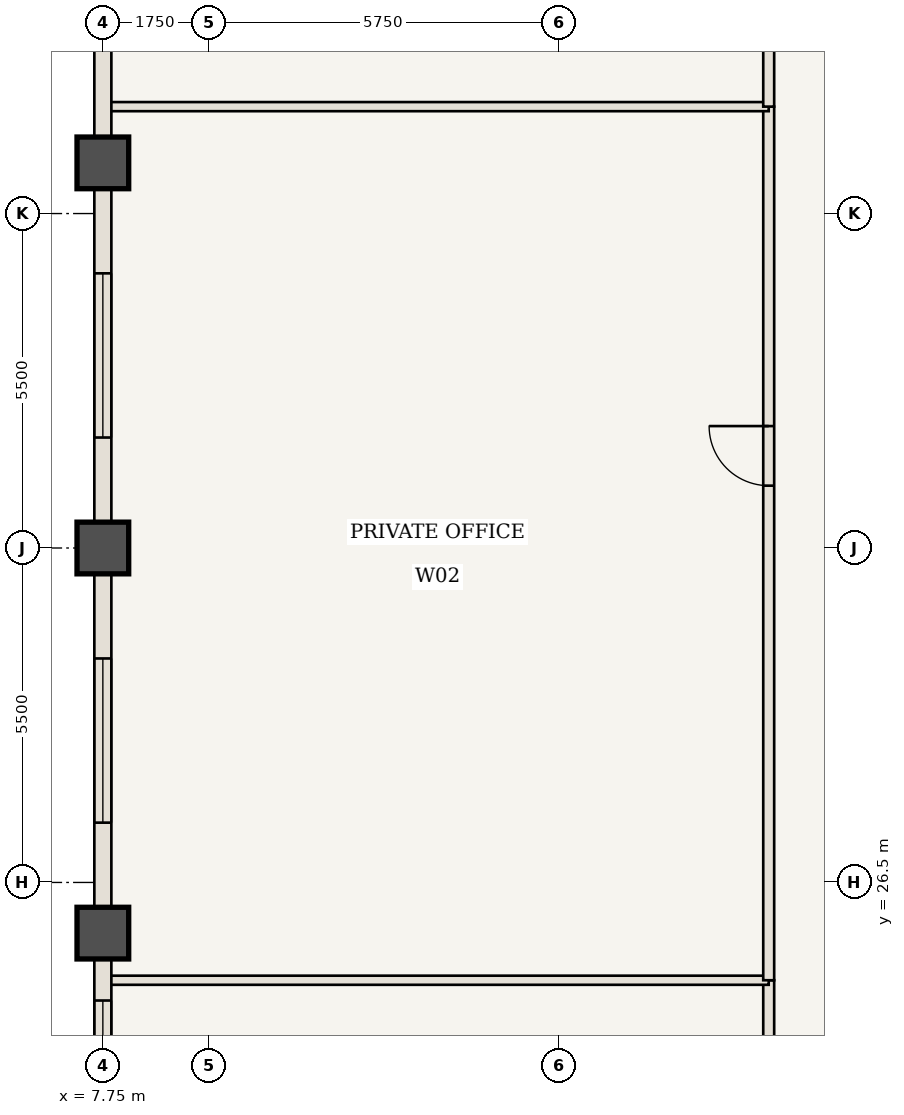
"""IFC4 building model, lengths in metres.
Left out: names, types, materials, properties, quantities, classifications, styles, units other than length and angle.
Written with IfcOpenShell. Run it as: python <this file> out.ifc"""

import sys

from ifc_helpers import new_model, si_unit, direction, frame, frame_2d, origin, origin_2d, place, context, subcontext, project, spatial, rectangle, extrude, element, fill, save


model = new_model("IFC4")
c1 = context("Model", 3, precision=1e-05, world=origin(), true_north=direction((0.0, 1.0)))
c2 = subcontext(c1, "Body", "Model", "MODEL_VIEW")
j1 = project(units=[si_unit("LENGTHUNIT", "METRE"), si_unit("PLANEANGLEUNIT", "RADIAN")], contexts=[c1])
p1 = place(None, origin())
s1 = spatial("IfcSite", under=j1, at=p1, CompositionType="ELEMENT")
p2 = place(p1, origin())
s2 = spatial("IfcBuilding", under=s1, at=p2, CompositionType="ELEMENT")
p3 = place(p2, frame((0.0, 0.0, 217.7)))
s3 = spatial("IfcBuildingStorey", under=s2, at=p3, CompositionType="ELEMENT", Elevation=217.7)
for number, where, z_axis, x_axis in (
    (1, (7.75, 25.667, 0.0), (0.0, 0.0, 1.0), (1.0, 0.0, 0.0)),
    (2, (7.75, 32.0, 0.0), (0.0, 0.0, 1.0), (1.0, 0.0, 0.0)),
    (3, (7.75, 38.333, 0.0), (0.0, 0.0, 1.0), (1.0, 0.0, 0.0)),
):
    element("IfcColumn", number, at=place(p3, frame(where, z_axis=z_axis, x_axis=x_axis)), inside=s3, PredefinedType="COLUMN", context=c2, shape_type="SweptSolid", body=[
        extrude(rectangle(XDim=0.85, YDim=0.85, at=origin_2d()), origin(), (0.0, 0.0, 1.0), 3.85),
    ])
p4 = place(p3, frame((18.7, 18.7, 0.0), z_axis=(0.0, 0.0, 1.0), x_axis=(0.0, 1.0, 0.0)))
e4 = element("IfcWall", 4, at=p4, inside=s3, PredefinedType="STANDARD", context=c2, shape_type="SweptSolid", body=[
    extrude(rectangle(XDim=6.192, YDim=0.18, at=frame_2d((3.096, 0.0))), origin(), (0.0, 0.0, 1.0), 3.685),
])
p5 = place(p4, frame((1.146, 0.0, 0.0)))
e5 = element("IfcOpeningElement", 5, at=p5, cuts=e4, PredefinedType="OPENING", context=c2, shape_type="SweptSolid", body=[
    extrude(rectangle(XDim=0.98, YDim=2.2, at=frame_2d((0.49, 1.1))), frame((0.0, 0.1, 0.0), z_axis=(0.0, -1.0, 0.0), x_axis=(1.0, 0.0, 0.0)), (0.0, 0.0, 1.0), 0.2),
])
p6 = place(p3, frame((7.81, 24.892, 0.0), z_axis=(0.0, 0.0, 1.0), x_axis=(1.0, 0.0, 0.0)))
e6 = element("IfcWall", 6, at=p6, inside=s3, PredefinedType="STANDARD", context=c2, shape_type="SweptSolid", body=[
    extrude(rectangle(XDim=10.89, YDim=0.15, at=frame_2d((5.445, 0.0))), origin(), (0.0, 0.0, 1.0), 3.685),
])
p7 = place(p3, frame((18.7, 24.892, 0.0), z_axis=(0.0, 0.0, 1.0), x_axis=(0.0, 1.0, 0.0)))
e7 = element("IfcWall", 7, at=p7, inside=s3, PredefinedType="STANDARD", context=c2, shape_type="SweptSolid", body=[
    extrude(rectangle(XDim=14.367, YDim=0.18, at=frame_2d((7.183, 0.0))), origin(), (0.0, 0.0, 1.0), 3.685),
])
p8 = place(p7, frame((8.133, 0.0, 0.0)))
e8 = element("IfcOpeningElement", 8, at=p8, cuts=e7, PredefinedType="OPENING", context=c2, shape_type="SweptSolid", body=[
    extrude(rectangle(XDim=0.98, YDim=2.2, at=frame_2d((0.49, 1.1))), frame((0.0, 0.1, 0.0), z_axis=(0.0, -1.0, 0.0), x_axis=(1.0, 0.0, 0.0)), (0.0, 0.0, 1.0), 0.2),
])
p9 = place(p3, frame((7.81, 39.258, 0.0), z_axis=(0.0, 0.0, 1.0), x_axis=(1.0, 0.0, 0.0)))
e9 = element("IfcWall", 9, at=p9, inside=s3, PredefinedType="STANDARD", context=c2, shape_type="SweptSolid", body=[
    extrude(rectangle(XDim=10.89, YDim=0.15, at=frame_2d((5.445, 0.0))), origin(), (0.0, 0.0, 1.0), 3.685),
])
p10 = place(p3, frame((18.7, 39.258, 0.0), z_axis=(0.0, 0.0, 1.0), x_axis=(0.0, 1.0, 0.0)))
e10 = element("IfcWall", 10, at=p10, inside=s3, PredefinedType="STANDARD", context=c2, shape_type="SweptSolid", body=[
    extrude(rectangle(XDim=6.042, YDim=0.18, at=frame_2d((3.021, 0.0))), origin(), (0.0, 0.0, 1.0), 3.685),
])
p11 = place(p10, frame((1.071, 0.0, 0.0)))
e11 = element("IfcOpeningElement", 11, at=p11, cuts=e10, PredefinedType="OPENING", context=c2, shape_type="SweptSolid", body=[
    extrude(rectangle(XDim=0.98, YDim=2.2, at=frame_2d((0.49, 1.1))), frame((0.0, 0.1, 0.0), z_axis=(0.0, -1.0, 0.0), x_axis=(1.0, 0.0, 0.0)), (0.0, 0.0, 1.0), 0.2),
])
p12 = place(p3, frame((7.75, 19.333, 0.0), z_axis=(0.0, 0.0, 1.0), x_axis=(0.0, 1.0, 0.0)))
e12 = element("IfcWall", 12, at=p12, inside=s3, PredefinedType="USERDEFINED", context=c2, shape_type="SweptSolid", body=[
    extrude(rectangle(XDim=6.333, YDim=0.28, at=frame_2d((3.167, 0.0))), origin(), (0.0, 0.0, 1.0), 2.985),
])
p13 = place(p12, frame((0.708, 0.0, 0.85)))
e13 = element("IfcOpeningElement", 13, at=p13, cuts=e12, PredefinedType="OPENING", context=c2, shape_type="SweptSolid", body=[
    extrude(rectangle(XDim=1.95, YDim=1.935, at=frame_2d((0.975, 0.968))), frame((0.0, 0.15, 0.0), z_axis=(0.0, -1.0, 0.0), x_axis=(1.0, 0.0, 0.0)), (0.0, 0.0, 1.0), 0.3),
])
p14 = place(p12, frame((3.625, 0.0, 0.85)))
e14 = element("IfcOpeningElement", 14, at=p14, cuts=e12, PredefinedType="OPENING", context=c2, shape_type="SweptSolid", body=[
    extrude(rectangle(XDim=1.6, YDim=1.935, at=frame_2d((0.8, 0.968))), frame((0.0, 0.15, 0.0), z_axis=(0.0, -1.0, 0.0), x_axis=(1.0, 0.0, 0.0)), (0.0, 0.0, 1.0), 0.3),
])
p15 = place(p3, frame((7.75, 25.667, 0.0), z_axis=(0.0, 0.0, 1.0), x_axis=(0.0, 1.0, 0.0)))
e15 = element("IfcWall", 15, at=p15, inside=s3, PredefinedType="USERDEFINED", context=c2, shape_type="SweptSolid", body=[
    extrude(rectangle(XDim=6.333, YDim=0.28, at=frame_2d((3.167, 0.0))), origin(), (0.0, 0.0, 1.0), 2.985),
])
p16 = place(p15, frame((1.817, 0.0, 0.85)))
e16 = element("IfcOpeningElement", 16, at=p16, cuts=e15, PredefinedType="OPENING", context=c2, shape_type="SweptSolid", body=[
    extrude(rectangle(XDim=2.7, YDim=1.935, at=frame_2d((1.35, 0.968))), frame((0.0, 0.15, 0.0), z_axis=(0.0, -1.0, 0.0), x_axis=(1.0, 0.0, 0.0)), (0.0, 0.0, 1.0), 0.3),
])
p17 = place(p3, frame((7.75, 32.0, 0.0), z_axis=(0.0, 0.0, 1.0), x_axis=(0.0, 1.0, 0.0)))
e17 = element("IfcWall", 17, at=p17, inside=s3, PredefinedType="USERDEFINED", context=c2, shape_type="SweptSolid", body=[
    extrude(rectangle(XDim=6.333, YDim=0.28, at=frame_2d((3.167, 0.0))), origin(), (0.0, 0.0, 1.0), 2.985),
])
p18 = place(p17, frame((1.817, 0.0, 0.85)))
e18 = element("IfcOpeningElement", 18, at=p18, cuts=e17, PredefinedType="OPENING", context=c2, shape_type="SweptSolid", body=[
    extrude(rectangle(XDim=2.7, YDim=1.935, at=frame_2d((1.35, 0.968))), frame((0.0, 0.15, 0.0), z_axis=(0.0, -1.0, 0.0), x_axis=(1.0, 0.0, 0.0)), (0.0, 0.0, 1.0), 0.3),
])
p19 = place(p3, frame((7.75, 38.333, 0.0), z_axis=(0.0, 0.0, 1.0), x_axis=(0.0, 1.0, 0.0)))
e19 = element("IfcWall", 19, at=p19, inside=s3, PredefinedType="USERDEFINED", context=c2, shape_type="SweptSolid", body=[
    extrude(rectangle(XDim=6.333, YDim=0.28, at=frame_2d((3.167, 0.0))), origin(), (0.0, 0.0, 1.0), 2.985),
])
p20 = place(p19, frame((3.675, 0.0, 0.85)))
e20 = element("IfcOpeningElement", 20, at=p20, cuts=e19, PredefinedType="OPENING", context=c2, shape_type="SweptSolid", body=[
    extrude(rectangle(XDim=1.95, YDim=1.935, at=frame_2d((0.975, 0.968))), frame((0.0, 0.15, 0.0), z_axis=(0.0, -1.0, 0.0), x_axis=(1.0, 0.0, 0.0)), (0.0, 0.0, 1.0), 0.3),
])
p21 = place(p8, origin())
e21 = element("IfcDoor", 21, at=p21, inside=s3, OperationType="SINGLE_SWING_RIGHT", PredefinedType="DOOR", context=c2, shape_type="SweptSolid", body=[
    extrude(rectangle(XDim=0.98, YDim=2.2, at=frame_2d((0.49, 1.1))), frame((0.0, 0.025, 0.0), z_axis=(0.0, -1.0, 0.0), x_axis=(1.0, 0.0, 0.0)), (0.0, 0.0, 1.0), 0.05),
])
fill(e8, e21)
p22 = place(p14, origin())
e22 = element("IfcWindow", 22, at=p22, inside=s3, PartitioningType="SINGLE_PANEL", PredefinedType="WINDOW", context=c2, shape_type="SweptSolid", body=[
    extrude(rectangle(XDim=1.6, YDim=1.935, at=frame_2d((0.8, 0.968))), frame((0.0, 0.03, 0.0), z_axis=(0.0, -1.0, 0.0), x_axis=(1.0, 0.0, 0.0)), (0.0, 0.0, 1.0), 0.06),
])
fill(e14, e22)
p23 = place(p16, origin())
e23 = element("IfcWindow", 23, at=p23, inside=s3, PartitioningType="SINGLE_PANEL", PredefinedType="WINDOW", context=c2, shape_type="SweptSolid", body=[
    extrude(rectangle(XDim=2.7, YDim=1.935, at=frame_2d((1.35, 0.968))), frame((0.0, 0.03, 0.0), z_axis=(0.0, -1.0, 0.0), x_axis=(1.0, 0.0, 0.0)), (0.0, 0.0, 1.0), 0.06),
])
fill(e16, e23)
p24 = place(p18, origin())
e24 = element("IfcWindow", 24, at=p24, inside=s3, PartitioningType="SINGLE_PANEL", PredefinedType="WINDOW", context=c2, shape_type="SweptSolid", body=[
    extrude(rectangle(XDim=2.7, YDim=1.935, at=frame_2d((1.35, 0.968))), frame((0.0, 0.03, 0.0), z_axis=(0.0, -1.0, 0.0), x_axis=(1.0, 0.0, 0.0)), (0.0, 0.0, 1.0), 0.06),
])
fill(e18, e24)
save(model, sys.argv[1])
